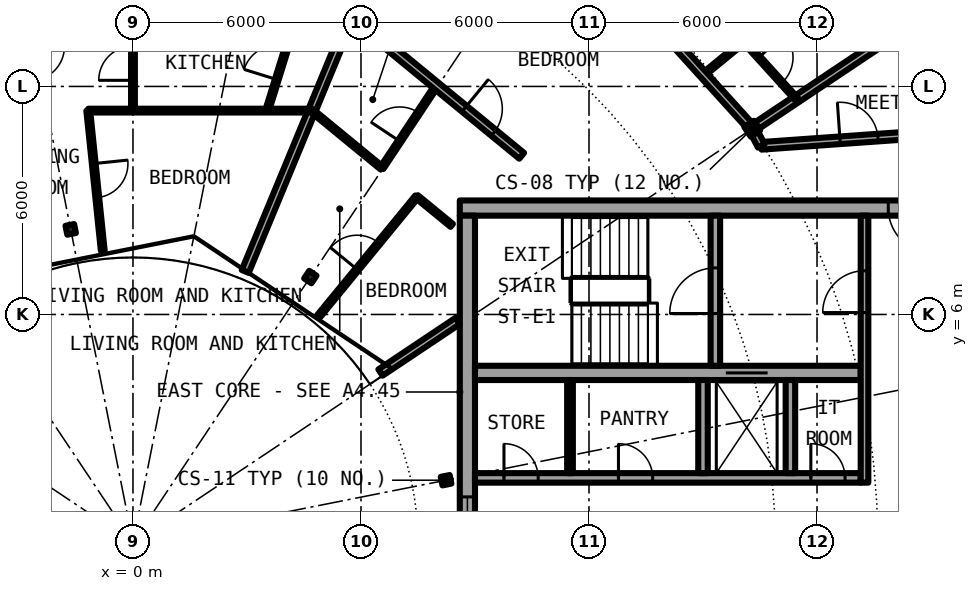
"""IFC4 building model, lengths in metres.
Left out: names, types, materials, properties, quantities, classifications, styles, units other than length and angle.
Written with IfcOpenShell. Run it as: python <this file> out.ifc"""

import sys

from ifc_helpers import new_model, si_unit, direction, frame, frame_2d, origin, origin_2d, place, context, subcontext, project, spatial, rectangle, i_section, extrude, element, fill, save


model = new_model("IFC4")
c1 = context("Model", 3, precision=1e-05, world=origin(), true_north=direction((0.0, 1.0)))
c2 = subcontext(c1, "Body", "Model", "MODEL_VIEW")
j1 = project(units=[si_unit("LENGTHUNIT", "METRE"), si_unit("PLANEANGLEUNIT", "RADIAN")], contexts=[c1])
p1 = place(None, origin())
s1 = spatial("IfcSite", under=j1, at=p1, CompositionType="ELEMENT")
p2 = place(p1, origin())
s2 = spatial("IfcBuilding", under=s1, at=p2, CompositionType="ELEMENT")
p3 = place(p2, frame((0.0, 0.0, 243.2)))
s3 = spatial("IfcBuildingStorey", under=s2, at=p3, CompositionType="ELEMENT", Elevation=243.2)
p4 = place(p3, frame((16.297, 10.889, 0.0), z_axis=(0.0, 0.0, 1.0), x_axis=(0.831469612303, 0.55557023302, 0.0)))
e1 = element("IfcColumn", 1, at=p4, inside=s3, PredefinedType="COLUMN", context=c2, shape_type="SweptSolid", body=[
    extrude(i_section(OverallWidth=0.3, OverallDepth=0.3, WebThickness=0.011, FlangeThickness=0.019, FilletRadius=0.027, at=origin_2d()), origin(), (0.0, 0.0, 1.0), 3.05),
])
for number, where, z_axis, x_axis in (
    (2, (8.239, 1.639, 0.0), (0.0, 0.0, 1.0), (0.981, 0.195, 0.0)),
    (3, (4.667, 6.984, 0.0), (0.0, 0.0, 1.0), (0.556, 0.831, 0.0)),
    (4, (-1.639, 8.239, 0.0), (0.0, 0.0, 1.0), (-0.195, 0.981, 0.0)),
):
    element("IfcColumn", number, at=place(p3, frame(where, z_axis=z_axis, x_axis=x_axis)), inside=s3, PredefinedType="COLUMN", context=c2, shape_type="SweptSolid", body=[
        extrude(i_section(OverallWidth=0.24, OverallDepth=0.23, WebThickness=0.008, FlangeThickness=0.012, FilletRadius=0.021, at=origin_2d()), origin(), (0.0, 0.0, 1.0), 3.05),
    ])
p5 = place(p3, frame((22.0, 8.8, 0.0), z_axis=(0.0, 0.0, 1.0), x_axis=(-1.0, 0.0, 0.0)))
e5 = element("IfcWall", 5, at=p5, inside=s3, PredefinedType="SHEAR", context=c2, shape_type="SweptSolid", body=[
    extrude(rectangle(XDim=13.4, YDim=0.4, at=frame_2d((6.7, 0.0))), origin(), (0.0, 0.0, 1.0), 3.05),
])
p6 = place(p5, frame((0.925, 0.0, 0.0)))
e6 = element("IfcOpeningElement", 6, at=p6, cuts=e5, PredefinedType="OPENING", context=c2, shape_type="SweptSolid", body=[
    extrude(rectangle(XDim=1.2, YDim=2.3, at=frame_2d((0.6, 1.15))), frame((0.0, 0.21, 0.0), z_axis=(0.0, -1.0, 0.0), x_axis=(1.0, 0.0, 0.0)), (0.0, 0.0, 1.0), 0.42),
])
p7 = place(p3, frame((8.8, -8.6, 0.0), z_axis=(0.0, 0.0, 1.0), x_axis=(0.0, 1.0, 0.0)))
e7 = element("IfcWall", 7, at=p7, inside=s3, PredefinedType="SHEAR", context=c2, shape_type="SweptSolid", body=[
    extrude(rectangle(XDim=17.2, YDim=0.4, at=frame_2d((8.6, 0.0))), origin(), (0.0, 0.0, 1.0), 3.05),
])
p8 = place(p7, frame((7.4, 0.0, 0.1)))
e8 = element("IfcOpeningElement", 8, at=p8, cuts=e7, PredefinedType="OPENING", context=c2, shape_type="SweptSolid", body=[
    extrude(rectangle(XDim=2.4, YDim=2.2, at=frame_2d((1.2, 1.1))), frame((0.0, 0.21, 0.0), z_axis=(0.0, -1.0, 0.0), x_axis=(1.0, 0.0, 0.0)), (0.0, 0.0, 1.0), 0.42),
])
p9 = place(p3, frame((9.0, 1.7, 0.0), z_axis=(0.0, 0.0, 1.0), x_axis=(1.0, 0.0, 0.0)))
e9 = element("IfcWall", 9, at=p9, inside=s3, PredefinedType="SHEAR", context=c2, shape_type="SweptSolid", body=[
    extrude(rectangle(XDim=10.15, YDim=0.25, at=frame_2d((5.075, 0.0))), origin(), (0.0, 0.0, 1.0), 3.05),
])
p10 = place(p9, frame((0.762, 0.0, 0.0)))
e10 = element("IfcOpeningElement", 10, at=p10, cuts=e9, PredefinedType="OPENING", context=c2, shape_type="SweptSolid", body=[
    extrude(rectangle(XDim=0.9, YDim=2.3, at=frame_2d((0.45, 1.15))), frame((0.0, 0.135, 0.0), z_axis=(0.0, -1.0, 0.0), x_axis=(1.0, 0.0, 0.0)), (0.0, 0.0, 1.0), 0.27),
])
p11 = place(p9, frame((3.775, 0.0, 0.0)))
e11 = element("IfcOpeningElement", 11, at=p11, cuts=e9, PredefinedType="OPENING", context=c2, shape_type="SweptSolid", body=[
    extrude(rectangle(XDim=0.9, YDim=2.3, at=frame_2d((0.45, 1.15))), frame((0.0, 0.135, 0.0), z_axis=(0.0, -1.0, 0.0), x_axis=(1.0, 0.0, 0.0)), (0.0, 0.0, 1.0), 0.27),
])
p12 = place(p9, frame((8.837, 0.0, 0.0)))
e12 = element("IfcOpeningElement", 12, at=p12, cuts=e9, PredefinedType="OPENING", context=c2, shape_type="SweptSolid", body=[
    extrude(rectangle(XDim=0.9, YDim=2.3, at=frame_2d((0.45, 1.15))), frame((0.0, 0.135, 0.0), z_axis=(0.0, -1.0, 0.0), x_axis=(1.0, 0.0, 0.0)), (0.0, 0.0, 1.0), 0.27),
])
p13 = place(p3, frame((9.0, 4.462, 0.0), z_axis=(0.0, 0.0, 1.0), x_axis=(1.0, 0.0, 0.0)))
e13 = element("IfcWall", 13, at=p13, inside=s3, PredefinedType="SHEAR", context=c2, shape_type="SweptSolid", body=[
    extrude(rectangle(XDim=10.15, YDim=0.375, at=frame_2d((5.075, 0.0))), origin(), (0.0, 0.0, 1.0), 3.05),
])
p14 = place(p13, frame((6.6, 0.0, 0.0)))
e14 = element("IfcOpeningElement", 14, at=p14, cuts=e13, PredefinedType="OPENING", context=c2, shape_type="SweptSolid", body=[
    extrude(rectangle(XDim=1.1, YDim=2.3, at=frame_2d((0.55, 1.15))), frame((0.0, 0.198, 0.0), z_axis=(0.0, -1.0, 0.0), x_axis=(1.0, 0.0, 0.0)), (0.0, 0.0, 1.0), 0.395),
])
p15 = place(p3, frame((15.325, 4.65, 0.0), z_axis=(0.0, 0.0, 1.0), x_axis=(0.0, 1.0, 0.0)))
e15 = element("IfcWall", 15, at=p15, inside=s3, PredefinedType="SHEAR", context=c2, shape_type="SweptSolid", body=[
    extrude(rectangle(XDim=3.95, YDim=0.25, at=frame_2d((1.975, 0.0))), origin(), (0.0, 0.0, 1.0), 3.05),
])
p16 = place(p15, frame((1.375, 0.0, 0.0)))
e16 = element("IfcOpeningElement", 16, at=p16, cuts=e15, PredefinedType="OPENING", context=c2, shape_type="SweptSolid", body=[
    extrude(rectangle(XDim=1.2, YDim=2.3, at=frame_2d((0.6, 1.15))), frame((0.0, 0.135, 0.0), z_axis=(0.0, -1.0, 0.0), x_axis=(1.0, 0.0, 0.0)), (0.0, 0.0, 1.0), 0.27),
])
for number, where, z_axis, x_axis in (
    (17, (15.0, 1.825, 0.0), (0.0, 0.0, 1.0), (0.0, 1.0, 0.0)),
    (18, (17.3, 1.825, 0.0), (0.0, 0.0, 1.0), (0.0, 1.0, 0.0)),
):
    element("IfcWall", number, at=place(p3, frame(where, z_axis=z_axis, x_axis=x_axis)), inside=s3, PredefinedType="SOLIDWALL", context=c2, shape_type="SweptSolid", body=[
        extrude(rectangle(XDim=2.45, YDim=0.25, at=frame_2d((1.225, 0.0))), origin(), (0.0, 0.0, 1.0), 2.7),
    ])
p17 = place(p3, frame((19.25, 1.575, 0.0), z_axis=(0.0, 0.0, 1.0), x_axis=(0.0, 1.0, 0.0)))
e19 = element("IfcWall", 19, at=p17, inside=s3, PredefinedType="SOLIDWALL", context=c2, shape_type="SweptSolid", body=[
    extrude(rectangle(XDim=7.025, YDim=0.2, at=frame_2d((3.513, 0.0))), origin(), (0.0, 0.0, 1.0), 2.7),
])
p18 = place(p17, frame((4.475, 0.0, 0.0)))
e20 = element("IfcOpeningElement", 20, at=p18, cuts=e19, PredefinedType="OPENING", context=c2, shape_type="SweptSolid", body=[
    extrude(rectangle(XDim=1.1, YDim=2.3, at=frame_2d((0.55, 1.15))), frame((0.0, 0.11, 0.0), z_axis=(0.0, -1.0, 0.0), x_axis=(1.0, 0.0, 0.0)), (0.0, 0.0, 1.0), 0.22),
])
p19 = place(p3, frame((11.5, 1.825, 0.0), z_axis=(0.0, 0.0, 1.0), x_axis=(0.0, 1.0, 0.0)))
e21 = element("IfcWall", 21, at=p19, inside=s3, PredefinedType="PARTITIONING", context=c2, shape_type="SweptSolid", body=[
    extrude(rectangle(XDim=2.45, YDim=0.15, at=frame_2d((1.225, 0.0))), origin(), (0.0, 0.0, 1.0), 2.7),
])
p20 = place(p3, frame((-1.177, 11.364, 0.0), z_axis=(0.0, 0.0, 1.0), x_axis=(0.103130722413, -0.994667810927, 0.0)))
e22 = element("IfcWall", 22, at=p20, inside=s3, PredefinedType="PARTITIONING", context=c2, shape_type="SweptSolid", body=[
    extrude(rectangle(XDim=3.705, YDim=0.1, at=frame_2d((1.853, 0.0))), origin(), (0.0, 0.0, 1.0), 2.7),
])
p21 = place(p20, frame((1.402, 0.0, 0.0)))
e23 = element("IfcOpeningElement", 23, at=p21, cuts=e22, PredefinedType="OPENING", context=c2, shape_type="SweptSolid", body=[
    extrude(rectangle(XDim=0.9, YDim=2.3, at=frame_2d((0.45, 1.15))), frame((0.0, 0.06, 0.0), z_axis=(0.0, -1.0, 0.0), x_axis=(1.0, 0.0, 0.0)), (0.0, 0.0, 1.0), 0.12),
])
p22 = place(p3, frame((0.0, 11.364, 0.0), z_axis=(0.0, 0.0, 1.0), x_axis=(0.0, 1.0, 0.0)))
e24 = element("IfcWall", 24, at=p22, inside=s3, PredefinedType="PARTITIONING", context=c2, shape_type="SweptSolid", body=[
    extrude(rectangle(XDim=2.494, YDim=0.1, at=frame_2d((1.247, 0.0))), origin(), (0.0, 0.0, 1.0), 2.7),
])
p23 = place(p22, frame((0.797, 0.0, 0.0)))
e25 = element("IfcOpeningElement", 25, at=p23, cuts=e24, PredefinedType="OPENING", context=c2, shape_type="SweptSolid", body=[
    extrude(rectangle(XDim=0.9, YDim=2.3, at=frame_2d((0.45, 1.15))), frame((0.0, 0.06, 0.0), z_axis=(0.0, -1.0, 0.0), x_axis=(1.0, 0.0, 0.0)), (0.0, 0.0, 1.0), 0.12),
])
p24 = place(p3, frame((2.954, 7.132, 0.0), z_axis=(0.0, 0.0, 1.0), x_axis=(0.38267858248, 0.923881541385, 0.0)))
e26 = element("IfcWall", 26, at=p24, inside=s3, PredefinedType="PARTITIONING", context=c2, shape_type="SweptSolid", body=[
    extrude(rectangle(XDim=7.28, YDim=0.2, at=frame_2d((3.64, 0.0))), origin(), (0.0, 0.0, 1.0), 2.7),
])
p25 = place(p3, frame((3.53, 11.364, 0.0), z_axis=(0.0, 0.0, 1.0), x_axis=(0.296725588533, 0.954962787291, 0.0)))
e27 = element("IfcWall", 27, at=p25, inside=s3, PredefinedType="PARTITIONING", context=c2, shape_type="SweptSolid", body=[
    extrude(rectangle(XDim=2.612, YDim=0.1, at=frame_2d((1.306, 0.0))), origin(), (0.0, 0.0, 1.0), 2.7),
])
p26 = place(p25, frame((0.856, 0.0, 0.0)))
e28 = element("IfcOpeningElement", 28, at=p26, cuts=e27, PredefinedType="OPENING", context=c2, shape_type="SweptSolid", body=[
    extrude(rectangle(XDim=0.9, YDim=2.3, at=frame_2d((0.45, 1.15))), frame((0.0, 0.06, 0.0), z_axis=(0.0, -1.0, 0.0), x_axis=(1.0, 0.0, 0.0)), (0.0, 0.0, 1.0), 0.12),
])
p27 = place(p3, frame((4.898, 5.968, 0.0), z_axis=(0.0, 0.0, 1.0), x_axis=(0.634313840507, 0.773075644256, 0.0)))
e29 = element("IfcWall", 29, at=p27, inside=s3, PredefinedType="PARTITIONING", context=c2, shape_type="SweptSolid", body=[
    extrude(rectangle(XDim=4.05, YDim=0.1, at=frame_2d((2.025, 0.0))), origin(), (0.0, 0.0, 1.0), 2.7),
])
p28 = place(p27, frame((1.575, 0.0, 0.0)))
e30 = element("IfcOpeningElement", 30, at=p28, cuts=e29, PredefinedType="OPENING", context=c2, shape_type="SweptSolid", body=[
    extrude(rectangle(XDim=0.9, YDim=2.3, at=frame_2d((0.45, 1.15))), frame((0.0, 0.06, 0.0), z_axis=(0.0, -1.0, 0.0), x_axis=(1.0, 0.0, 0.0)), (0.0, 0.0, 1.0), 0.12),
])
p29 = place(p3, frame((6.547, 9.854, 0.0), z_axis=(0.0, 0.0, 1.0), x_axis=(0.553289146762, 0.832989267683, 0.0)))
e31 = element("IfcWall", 31, at=p29, inside=s3, PredefinedType="PARTITIONING", context=c2, shape_type="SweptSolid", body=[
    extrude(rectangle(XDim=2.597, YDim=0.1, at=frame_2d((1.298, 0.0))), origin(), (0.0, 0.0, 1.0), 2.7),
])
p30 = place(p29, frame((0.848, 0.0, 0.0)))
e32 = element("IfcOpeningElement", 32, at=p30, cuts=e31, PredefinedType="OPENING", context=c2, shape_type="SweptSolid", body=[
    extrude(rectangle(XDim=0.9, YDim=2.3, at=frame_2d((0.45, 1.15))), frame((0.0, 0.06, 0.0), z_axis=(0.0, -1.0, 0.0), x_axis=(1.0, 0.0, 0.0)), (0.0, 0.0, 1.0), 0.12),
])
p31 = place(p3, frame((15.009, 12.31, 0.0), z_axis=(0.0, 0.0, 1.0), x_axis=(0.773321325714, 0.634014295735, 0.0)))
e33 = element("IfcWall", 33, at=p31, inside=s3, PredefinedType="PARTITIONING", context=c2, shape_type="SweptSolid", body=[
    extrude(rectangle(XDim=1.386, YDim=0.1, at=frame_2d((0.693, 0.0))), origin(), (0.0, 0.0, 1.0), 2.7),
])
p32 = place(p3, frame((16.422, 10.972, 0.0), z_axis=(0.0, 0.0, 1.0), x_axis=(0.831263363926, 0.555878781566, 0.0)))
e34 = element("IfcWall", 34, at=p32, inside=s3, PredefinedType="PARTITIONING", context=c2, shape_type="SweptSolid", body=[
    extrude(rectangle(XDim=4.109, YDim=0.2, at=frame_2d((2.055, 0.0))), origin(), (0.0, 0.0, 1.0), 2.7),
])
p33 = place(p3, frame((6.513, 4.472, 0.0), z_axis=(0.0, 0.0, 1.0), x_axis=(0.831450132577, 0.555599385382, 0.0)))
e35 = element("IfcWall", 35, at=p33, inside=s3, PredefinedType="PARTITIONING", context=c2, shape_type="SweptSolid", body=[
    extrude(rectangle(XDim=2.443, YDim=0.2, at=frame_2d((1.221, 0.0))), origin(), (0.0, 0.0, 1.0), 2.7),
])
p34 = place(p3, frame((16.535, 10.437, 0.0), z_axis=(0.0, 0.0, 1.0), x_axis=(0.997515141784, 0.070452408845, 0.0)))
e36 = element("IfcWall", 36, at=p34, inside=s3, PredefinedType="PARTITIONING", context=c2, shape_type="SweptSolid", body=[
    extrude(rectangle(XDim=5.153, YDim=0.2, at=frame_2d((2.576, 0.0))), origin(), (0.0, 0.0, 1.0), 2.7),
])
p35 = place(p34, frame((2.076, 0.0, 0.0)))
e37 = element("IfcOpeningElement", 37, at=p35, cuts=e36, PredefinedType="OPENING", context=c2, shape_type="SweptSolid", body=[
    extrude(rectangle(XDim=1.0, YDim=2.3, at=frame_2d((0.5, 1.15))), frame((0.0, 0.11, 0.0), z_axis=(0.0, -1.0, 0.0), x_axis=(1.0, 0.0, 0.0)), (0.0, 0.0, 1.0), 0.22),
])
p36 = place(p3, frame((-1.177, 11.364, 0.0), z_axis=(0.0, 0.0, 1.0), x_axis=(1.0, 0.0, 0.0)))
e38 = element("IfcWall", 38, at=p36, inside=s3, PredefinedType="PARTITIONING", context=c2, shape_type="SweptSolid", body=[
    extrude(rectangle(XDim=5.884, YDim=0.1, at=frame_2d((2.942, 0.0))), origin(), (0.0, 0.0, 1.0), 2.7),
])
p37 = place(p3, frame((4.707, 11.364, 0.0), z_axis=(0.0, 0.0, 1.0), x_axis=(0.773033390712, -0.634365333893, 0.0)))
e39 = element("IfcWall", 39, at=p37, inside=s3, PredefinedType="PARTITIONING", context=c2, shape_type="SweptSolid", body=[
    extrude(rectangle(XDim=2.38, YDim=0.1, at=frame_2d((1.19, 0.0))), origin(), (0.0, 0.0, 1.0), 2.7),
])
p38 = place(p3, frame((7.466, 9.1, 0.0), z_axis=(0.0, 0.0, 1.0), x_axis=(0.772869802794, -0.634564628646, 0.0)))
e40 = element("IfcWall", 40, at=p38, inside=s3, PredefinedType="PARTITIONING", context=c2, shape_type="SweptSolid", body=[
    extrude(rectangle(XDim=1.192, YDim=0.1, at=frame_2d((0.596, 0.0))), origin(), (0.0, 0.0, 1.0), 2.7),
])
p39 = place(p3, frame((5.742, 13.857, 0.0), z_axis=(0.0, 0.0, 1.0), x_axis=(0.772989261861, -0.634419105204, 0.0)))
e41 = element("IfcWall", 41, at=p39, inside=s3, PredefinedType="PARTITIONING", context=c2, shape_type="SweptSolid", body=[
    extrude(rectangle(XDim=5.803, YDim=0.2, at=frame_2d((2.902, 0.0))), origin(), (0.0, 0.0, 1.0), 2.7),
])
p40 = place(p39, frame((3.851, 0.0, 0.0)))
e42 = element("IfcOpeningElement", 42, at=p40, cuts=e41, PredefinedType="OPENING", context=c2, shape_type="SweptSolid", body=[
    extrude(rectangle(XDim=1.0, YDim=2.3, at=frame_2d((0.5, 1.15))), frame((0.0, 0.11, 0.0), z_axis=(0.0, -1.0, 0.0), x_axis=(1.0, 0.0, 0.0)), (0.0, 0.0, 1.0), 0.22),
])
p41 = place(p3, frame((12.434, 15.151, 0.0), z_axis=(0.0, 0.0, 1.0), x_axis=(0.671619657805, -0.740896102871, 0.0)))
e43 = element("IfcWall", 43, at=p41, inside=s3, PredefinedType="PARTITIONING", context=c2, shape_type="SweptSolid", body=[
    extrude(rectangle(XDim=5.6, YDim=0.2, at=frame_2d((2.8, 0.0))), origin(), (0.0, 0.0, 1.0), 2.45),
])
p42 = place(p41, frame((1.417, 0.0, 0.0)))
e44 = element("IfcOpeningElement", 44, at=p42, cuts=e43, PredefinedType="OPENING", context=c2, shape_type="SweptSolid", body=[
    extrude(rectangle(XDim=1.0, YDim=2.3, at=frame_2d((0.5, 1.15))), frame((0.0, 0.11, 0.0), z_axis=(0.0, -1.0, 0.0), x_axis=(1.0, 0.0, 0.0)), (0.0, 0.0, 1.0), 0.22),
])
p43 = place(p3, frame((16.367, 10.756, 0.0), z_axis=(0.0, 0.0, 1.0), x_axis=(0.465802239822, -0.884888848035, 0.0)))
e45 = element("IfcWall", 45, at=p43, inside=s3, PredefinedType="PARTITIONING", context=c2, shape_type="SweptSolid", body=[
    extrude(rectangle(XDim=0.361, YDim=0.2, at=frame_2d((0.18, 0.0))), origin(), (0.0, 0.0, 1.0), 2.7),
])
p44 = place(p3, frame((16.081, 13.189, 0.0), z_axis=(0.0, 0.0, 1.0), x_axis=(0.671678456097, -0.74084279818, 0.0)))
e46 = element("IfcWall", 46, at=p44, inside=s3, PredefinedType="PARTITIONING", context=c2, shape_type="SweptSolid", body=[
    extrude(rectangle(XDim=2.054, YDim=0.1, at=frame_2d((1.027, 0.0))), origin(), (0.0, 0.0, 1.0), 2.7),
])
p45 = place(p44, frame((0.577, 0.0, 0.0)))
e47 = element("IfcOpeningElement", 47, at=p45, cuts=e46, PredefinedType="OPENING", context=c2, shape_type="SweptSolid", body=[
    extrude(rectangle(XDim=0.9, YDim=2.3, at=frame_2d((0.45, 1.15))), frame((0.0, 0.06, 0.0), z_axis=(0.0, -1.0, 0.0), x_axis=(1.0, 0.0, 0.0)), (0.0, 0.0, 1.0), 0.12),
])
p46 = place(p14, origin())
e48 = element("IfcDoor", 48, at=p46, inside=s3, OperationType="DOUBLE_DOOR_SLIDING", PredefinedType="DOOR", context=c2, shape_type="SweptSolid", body=[
    extrude(rectangle(XDim=1.1, YDim=2.3, at=frame_2d((0.55, 1.15))), frame((0.0, 0.025, 0.0), z_axis=(0.0, -1.0, 0.0), x_axis=(1.0, 0.0, 0.0)), (0.0, 0.0, 1.0), 0.05),
])
fill(e14, e48)
p47 = place(p10, origin())
e49 = element("IfcDoor", 49, at=p47, inside=s3, OperationType="SINGLE_SWING_RIGHT", PredefinedType="DOOR", context=c2, shape_type="SweptSolid", body=[
    extrude(rectangle(XDim=0.9, YDim=2.3, at=frame_2d((0.45, 1.15))), frame((0.0, 0.025, 0.0), z_axis=(0.0, -1.0, 0.0), x_axis=(1.0, 0.0, 0.0)), (0.0, 0.0, 1.0), 0.05),
])
fill(e10, e49)
p48 = place(p11, origin())
e50 = element("IfcDoor", 50, at=p48, inside=s3, OperationType="SINGLE_SWING_RIGHT", PredefinedType="DOOR", context=c2, shape_type="SweptSolid", body=[
    extrude(rectangle(XDim=0.9, YDim=2.3, at=frame_2d((0.45, 1.15))), frame((0.0, 0.025, 0.0), z_axis=(0.0, -1.0, 0.0), x_axis=(1.0, 0.0, 0.0)), (0.0, 0.0, 1.0), 0.05),
])
fill(e11, e50)
p49 = place(p12, origin())
e51 = element("IfcDoor", 51, at=p49, inside=s3, OperationType="SINGLE_SWING_LEFT", PredefinedType="DOOR", context=c2, shape_type="SweptSolid", body=[
    extrude(rectangle(XDim=0.9, YDim=2.3, at=frame_2d((0.45, 1.15))), frame((0.0, 0.025, 0.0), z_axis=(0.0, -1.0, 0.0), x_axis=(1.0, 0.0, 0.0)), (0.0, 0.0, 1.0), 0.05),
])
fill(e12, e51)
p50 = place(p16, origin())
e52 = element("IfcDoor", 52, at=p50, inside=s3, OperationType="SINGLE_SWING_LEFT", PredefinedType="DOOR", context=c2, shape_type="SweptSolid", body=[
    extrude(rectangle(XDim=1.2, YDim=2.3, at=frame_2d((0.6, 1.15))), frame((0.0, 0.025, 0.0), z_axis=(0.0, -1.0, 0.0), x_axis=(1.0, 0.0, 0.0)), (0.0, 0.0, 1.0), 0.05),
])
fill(e16, e52)
p51 = place(p18, origin())
e53 = element("IfcDoor", 53, at=p51, inside=s3, OperationType="SINGLE_SWING_LEFT", PredefinedType="DOOR", context=c2, shape_type="SweptSolid", body=[
    extrude(rectangle(XDim=1.1, YDim=2.3, at=frame_2d((0.55, 1.15))), frame((0.0, 0.025, 0.0), z_axis=(0.0, -1.0, 0.0), x_axis=(1.0, 0.0, 0.0)), (0.0, 0.0, 1.0), 0.05),
])
fill(e20, e53)
p52 = place(p6, origin())
e54 = element("IfcDoor", 54, at=p52, inside=s3, OperationType="SINGLE_SWING_RIGHT", PredefinedType="DOOR", context=c2, shape_type="SweptSolid", body=[
    extrude(rectangle(XDim=1.2, YDim=2.3, at=frame_2d((0.6, 1.15))), frame((0.0, 0.025, 0.0), z_axis=(0.0, -1.0, 0.0), x_axis=(1.0, 0.0, 0.0)), (0.0, 0.0, 1.0), 0.05),
])
fill(e6, e54)
p53 = place(p8, origin())
e55 = element("IfcWindow", 55, at=p53, inside=s3, PartitioningType="SINGLE_PANEL", PredefinedType="WINDOW", context=c2, shape_type="SweptSolid", body=[
    extrude(rectangle(XDim=2.4, YDim=2.2, at=frame_2d((1.2, 1.1))), frame((0.0, 0.03, 0.0), z_axis=(0.0, -1.0, 0.0), x_axis=(1.0, 0.0, 0.0)), (0.0, 0.0, 1.0), 0.06),
])
fill(e8, e55)
p54 = place(p45, origin())
e56 = element("IfcDoor", 56, at=p54, inside=s3, OperationType="SINGLE_SWING_RIGHT", PredefinedType="DOOR", context=c2, shape_type="SweptSolid", body=[
    extrude(rectangle(XDim=0.9, YDim=2.3, at=frame_2d((0.45, 1.15))), frame((0.0, 0.025, 0.0), z_axis=(0.0, -1.0, 0.0), x_axis=(1.0, 0.0, 0.0)), (0.0, 0.0, 1.0), 0.05),
])
fill(e47, e56)
p55 = place(p40, origin())
e57 = element("IfcDoor", 57, at=p55, inside=s3, OperationType="SINGLE_SWING_RIGHT", PredefinedType="DOOR", context=c2, shape_type="SweptSolid", body=[
    extrude(rectangle(XDim=1.0, YDim=2.3, at=frame_2d((0.5, 1.15))), frame((0.0, 0.025, 0.0), z_axis=(0.0, -1.0, 0.0), x_axis=(1.0, 0.0, 0.0)), (0.0, 0.0, 1.0), 0.05),
])
fill(e42, e57)
p56 = place(p30, origin())
e58 = element("IfcDoor", 58, at=p56, inside=s3, OperationType="SINGLE_SWING_RIGHT", PredefinedType="DOOR", context=c2, shape_type="SweptSolid", body=[
    extrude(rectangle(XDim=0.9, YDim=2.3, at=frame_2d((0.45, 1.15))), frame((0.0, 0.025, 0.0), z_axis=(0.0, -1.0, 0.0), x_axis=(1.0, 0.0, 0.0)), (0.0, 0.0, 1.0), 0.05),
])
fill(e32, e58)
p57 = place(p28, origin())
e59 = element("IfcDoor", 59, at=p57, inside=s3, OperationType="SINGLE_SWING_RIGHT", PredefinedType="DOOR", context=c2, shape_type="SweptSolid", body=[
    extrude(rectangle(XDim=0.9, YDim=2.3, at=frame_2d((0.45, 1.15))), frame((0.0, 0.025, 0.0), z_axis=(0.0, -1.0, 0.0), x_axis=(1.0, 0.0, 0.0)), (0.0, 0.0, 1.0), 0.05),
])
fill(e30, e59)
p58 = place(p23, origin())
e60 = element("IfcDoor", 60, at=p58, inside=s3, OperationType="SINGLE_SWING_RIGHT", PredefinedType="DOOR", context=c2, shape_type="SweptSolid", body=[
    extrude(rectangle(XDim=0.9, YDim=2.3, at=frame_2d((0.45, 1.15))), frame((0.0, 0.025, 0.0), z_axis=(0.0, -1.0, 0.0), x_axis=(1.0, 0.0, 0.0)), (0.0, 0.0, 1.0), 0.05),
])
fill(e25, e60)
p59 = place(p26, origin())
e61 = element("IfcDoor", 61, at=p59, inside=s3, OperationType="SINGLE_SWING_RIGHT", PredefinedType="DOOR", context=c2, shape_type="SweptSolid", body=[
    extrude(rectangle(XDim=0.9, YDim=2.3, at=frame_2d((0.45, 1.15))), frame((0.0, 0.025, 0.0), z_axis=(0.0, -1.0, 0.0), x_axis=(1.0, 0.0, 0.0)), (0.0, 0.0, 1.0), 0.05),
])
fill(e28, e61)
p60 = place(p21, origin())
e62 = element("IfcDoor", 62, at=p60, inside=s3, OperationType="SINGLE_SWING_RIGHT", PredefinedType="DOOR", context=c2, shape_type="SweptSolid", body=[
    extrude(rectangle(XDim=0.9, YDim=2.3, at=frame_2d((0.45, 1.15))), frame((0.0, 0.025, 0.0), z_axis=(0.0, -1.0, 0.0), x_axis=(1.0, 0.0, 0.0)), (0.0, 0.0, 1.0), 0.05),
])
fill(e23, e62)
p61 = place(p35, origin())
e63 = element("IfcDoor", 63, at=p61, inside=s3, OperationType="SINGLE_SWING_LEFT", PredefinedType="DOOR", context=c2, shape_type="SweptSolid", body=[
    extrude(rectangle(XDim=1.0, YDim=2.3, at=frame_2d((0.5, 1.15))), frame((0.0, 0.025, 0.0), z_axis=(0.0, -1.0, 0.0), x_axis=(1.0, 0.0, 0.0)), (0.0, 0.0, 1.0), 0.05),
])
fill(e37, e63)
save(model, sys.argv[1])
